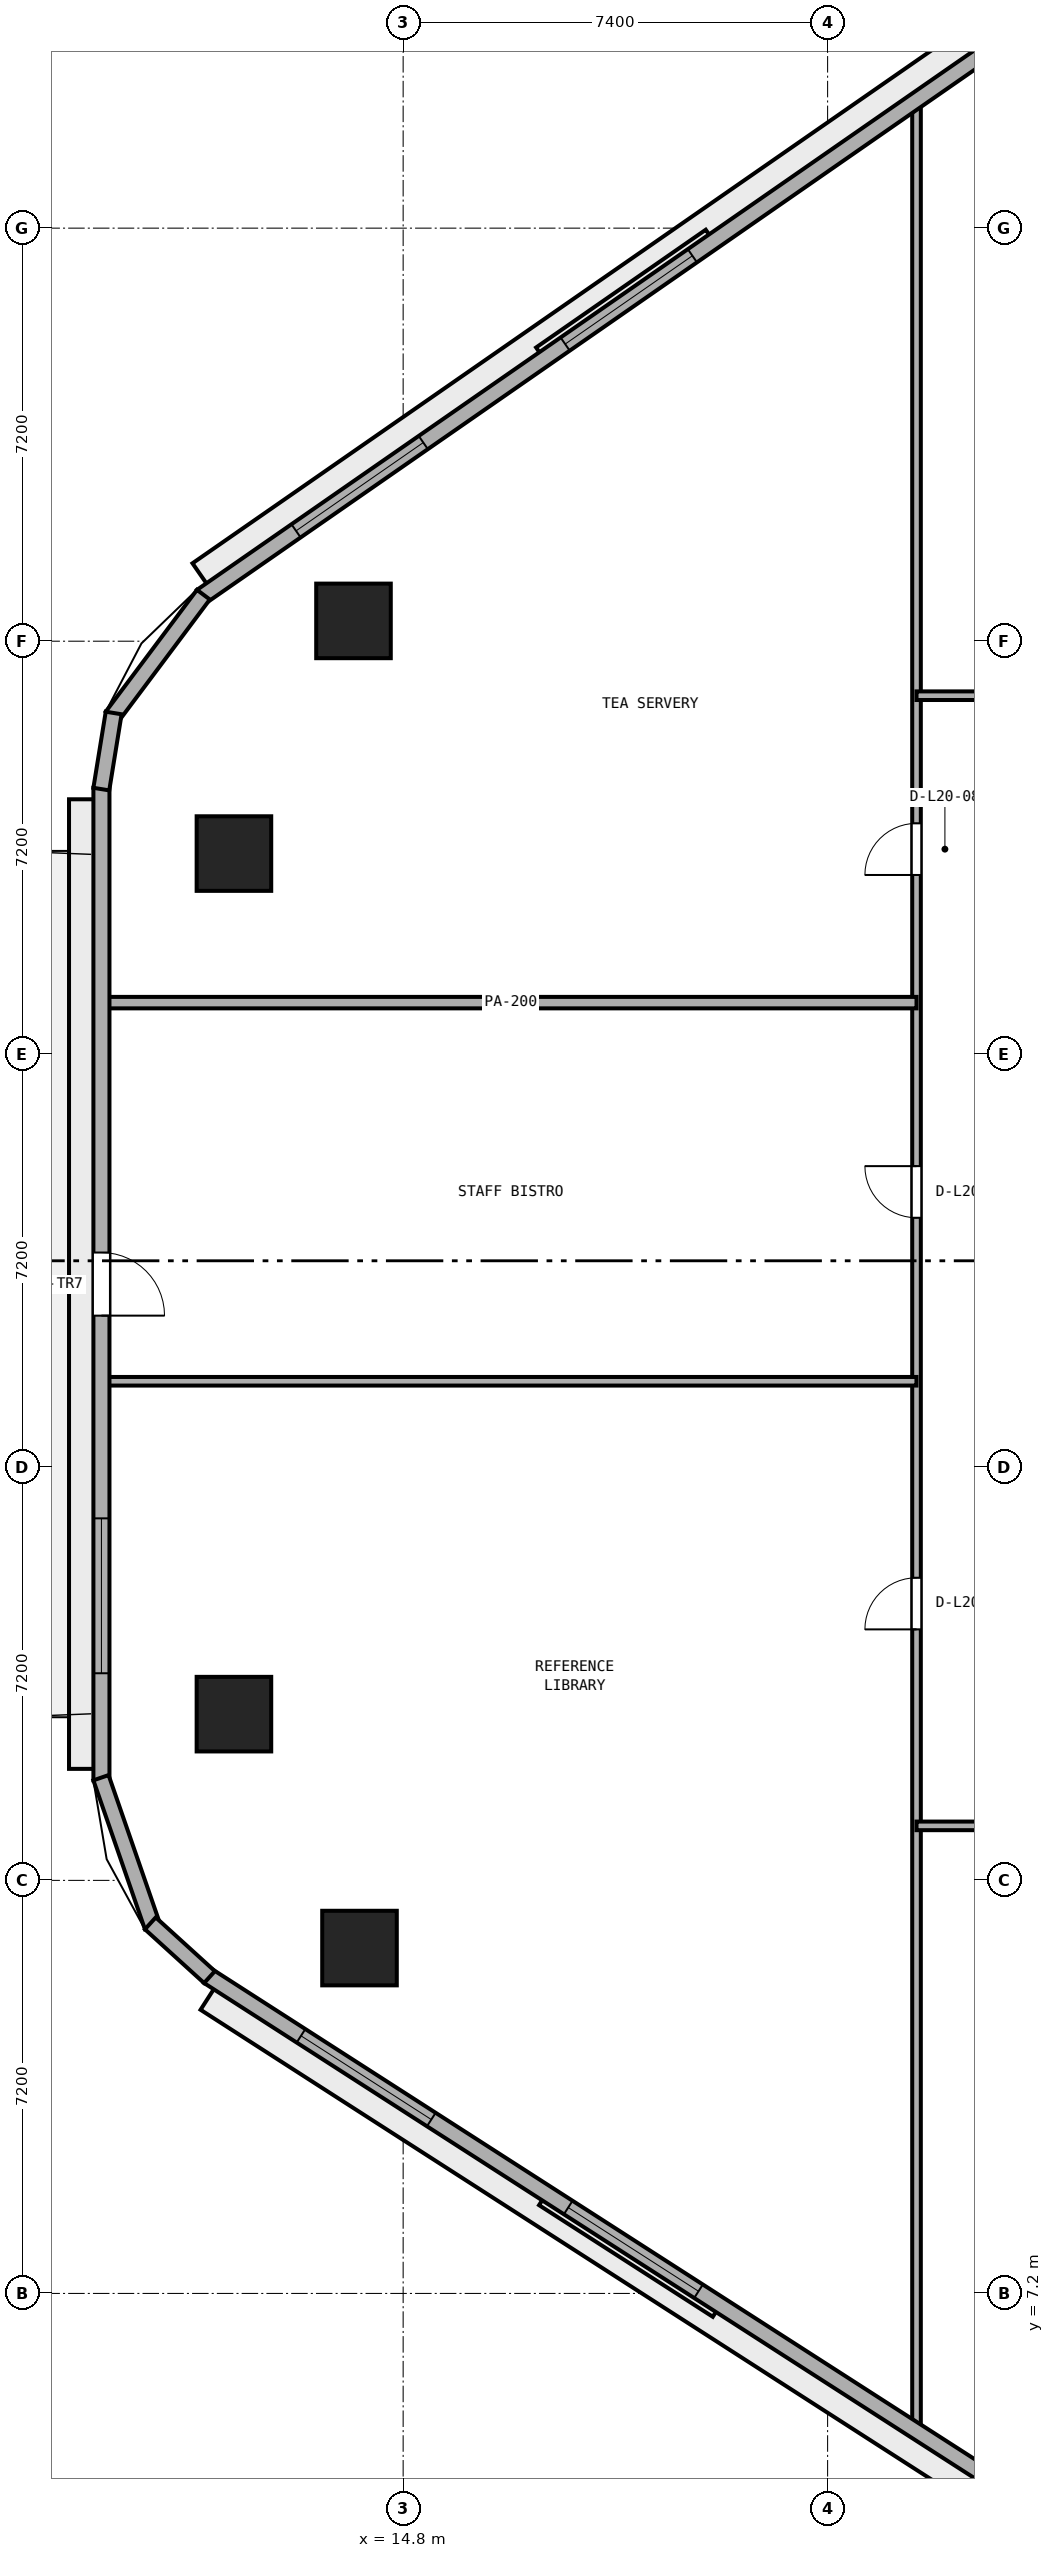
"""IFC4 building model, lengths in metres.
Left out: names, types, materials, properties, quantities, classifications, styles, units other than length and angle.
Written with IfcOpenShell. Run it as: python <this file> out.ifc"""

import sys

from ifc_helpers import new_model, si_unit, direction, frame, frame_2d, origin, origin_2d, place, context, subcontext, project, spatial, rectangle, extrude, element, fill, save


model = new_model("IFC4")
c1 = context("Model", 3, precision=1e-05, world=origin(), true_north=direction((0.0, 1.0)))
c2 = subcontext(c1, "Body", "Model", "MODEL_VIEW")
j1 = project(units=[si_unit("LENGTHUNIT", "METRE"), si_unit("PLANEANGLEUNIT", "RADIAN")], contexts=[c1])
p1 = place(None, origin())
s1 = spatial("IfcSite", under=j1, at=p1, CompositionType="ELEMENT")
p2 = place(p1, origin())
s2 = spatial("IfcBuilding", under=s1, at=p2, CompositionType="ELEMENT")
p3 = place(p2, frame((0.0, 0.0, 82.0)))
s3 = spatial("IfcBuildingStorey", under=s2, at=p3, CompositionType="ELEMENT", Elevation=82.0)
for number, where, z_axis, x_axis in (
    (1, (13.934, 36.354, 0.0), (0.0, 0.0, 1.0), (1.0, 0.0, 0.0)),
    (2, (11.85, 32.298, 0.0), (0.0, 0.0, 1.0), (1.0, 0.0, 0.0)),
    (3, (11.85, 17.298, 0.0), (0.0, 0.0, 1.0), (1.0, 0.0, 0.0)),
    (4, (14.039, 13.22, 0.0), (0.0, 0.0, 1.0), (1.0, 0.0, 0.0)),
):
    element("IfcColumn", number, at=place(p3, frame(where, z_axis=z_axis, x_axis=x_axis)), inside=s3, PredefinedType="COLUMN", context=c2, shape_type="SweptSolid", body=[
        extrude(rectangle(XDim=1.3, YDim=1.3, at=origin_2d()), origin(), (0.0, 0.0, 1.0), 3.8),
    ])
p4 = place(p3, frame((23.75, 4.769, 0.0), z_axis=(0.0, 0.0, 1.0), x_axis=(0.0, 1.0, 0.0)))
e5 = element("IfcWall", 5, at=p4, inside=s3, PredefinedType="PARTITIONING", context=c2, shape_type="SweptSolid", body=[
    extrude(rectangle(XDim=40.691, YDim=0.15, at=frame_2d((20.345, 0.0))), origin(), (0.0, 0.0, 1.0), 3.525),
])
p5 = place(p4, frame((14.006, 0.0, 0.0)))
e6 = element("IfcOpeningElement", 6, at=p5, cuts=e5, PredefinedType="OPENING", context=c2, shape_type="SweptSolid", body=[
    extrude(rectangle(XDim=0.9, YDim=2.1, at=frame_2d((0.45, 1.05))), frame((0.0, 0.085, 0.0), z_axis=(0.0, -1.0, 0.0), x_axis=(1.0, 0.0, 0.0)), (0.0, 0.0, 1.0), 0.17),
])
p6 = place(p4, frame((21.181, 0.0, 0.0)))
e7 = element("IfcOpeningElement", 7, at=p6, cuts=e5, PredefinedType="OPENING", context=c2, shape_type="SweptSolid", body=[
    extrude(rectangle(XDim=0.9, YDim=2.1, at=frame_2d((0.45, 1.05))), frame((0.0, 0.085, 0.0), z_axis=(0.0, -1.0, 0.0), x_axis=(1.0, 0.0, 0.0)), (0.0, 0.0, 1.0), 0.17),
])
p7 = place(p4, frame((27.156, 0.0, 0.0)))
e8 = element("IfcOpeningElement", 8, at=p7, cuts=e5, PredefinedType="OPENING", context=c2, shape_type="SweptSolid", body=[
    extrude(rectangle(XDim=0.9, YDim=2.1, at=frame_2d((0.45, 1.05))), frame((0.0, 0.085, 0.0), z_axis=(0.0, -1.0, 0.0), x_axis=(1.0, 0.0, 0.0)), (0.0, 0.0, 1.0), 0.17),
])
p8 = place(p3, frame((23.75, 15.35, 0.0), z_axis=(0.0, 0.0, 1.0), x_axis=(1.0, 0.0, 0.0)))
e9 = element("IfcWall", 9, at=p8, inside=s3, PredefinedType="PARTITIONING", context=c2, shape_type="SweptSolid", body=[
    extrude(rectangle(XDim=26.5, YDim=0.15, at=frame_2d((13.25, 0.0))), origin(), (0.0, 0.0, 1.0), 3.525),
])
p9 = place(p8, frame((4.445, 0.0, 0.0)))
e10 = element("IfcOpeningElement", 10, at=p9, cuts=e9, PredefinedType="OPENING", context=c2, shape_type="SweptSolid", body=[
    extrude(rectangle(XDim=0.9, YDim=2.1, at=frame_2d((0.45, 1.05))), frame((0.0, 0.085, 0.0), z_axis=(0.0, -1.0, 0.0), x_axis=(1.0, 0.0, 0.0)), (0.0, 0.0, 1.0), 0.17),
])
p10 = place(p8, frame((17.455, 0.0, 0.0)))
e11 = element("IfcOpeningElement", 11, at=p10, cuts=e9, PredefinedType="OPENING", context=c2, shape_type="SweptSolid", body=[
    extrude(rectangle(XDim=0.9, YDim=2.1, at=frame_2d((0.45, 1.05))), frame((0.0, 0.085, 0.0), z_axis=(0.0, -1.0, 0.0), x_axis=(1.0, 0.0, 0.0)), (0.0, 0.0, 1.0), 0.17),
])
p11 = place(p3, frame((9.605, 23.1, 0.0), z_axis=(0.0, 0.0, 1.0), x_axis=(1.0, 0.0, 0.0)))
e12 = element("IfcWall", 12, at=p11, inside=s3, PredefinedType="PARTITIONING", context=c2, shape_type="SweptSolid", body=[
    extrude(rectangle(XDim=14.144, YDim=0.15, at=frame_2d((7.072, 0.0))), origin(), (0.0, 0.0, 1.0), 3.525),
])
p12 = place(p3, frame((9.605, 29.7, 0.0), z_axis=(0.0, 0.0, 1.0), x_axis=(1.0, 0.0, 0.0)))
e13 = element("IfcWall", 13, at=p12, inside=s3, PredefinedType="PARTITIONING", context=c2, shape_type="SweptSolid", body=[
    extrude(rectangle(XDim=14.145, YDim=0.2, at=frame_2d((7.073, 0.0))), origin(), (0.0, 0.0, 1.0), 3.525),
])
p13 = place(p3, frame((23.75, 35.05, 0.0), z_axis=(0.0, 0.0, 1.0), x_axis=(1.0, 0.0, 0.0)))
e14 = element("IfcWall", 14, at=p13, inside=s3, PredefinedType="PARTITIONING", context=c2, shape_type="SweptSolid", body=[
    extrude(rectangle(XDim=26.5, YDim=0.15, at=frame_2d((13.25, 0.0))), origin(), (0.0, 0.0, 1.0), 3.525),
])
p14 = place(p13, frame((2.195, 0.0, 0.0)))
e15 = element("IfcOpeningElement", 15, at=p14, cuts=e14, PredefinedType="OPENING", context=c2, shape_type="SweptSolid", body=[
    extrude(rectangle(XDim=1.0, YDim=2.12, at=frame_2d((0.5, 1.06))), frame((0.0, 0.085, 0.0), z_axis=(0.0, -1.0, 0.0), x_axis=(1.0, 0.0, 0.0)), (0.0, 0.0, 1.0), 0.17),
])
p15 = place(p13, frame((10.4, 0.0, 0.0)))
e16 = element("IfcOpeningElement", 16, at=p15, cuts=e14, PredefinedType="OPENING", context=c2, shape_type="SweptSolid", body=[
    extrude(rectangle(XDim=1.0, YDim=2.12, at=frame_2d((0.5, 1.06))), frame((0.0, 0.085, 0.0), z_axis=(0.0, -1.0, 0.0), x_axis=(1.0, 0.0, 0.0)), (0.0, 0.0, 1.0), 0.17),
])
p16 = place(p13, frame((21.005, 0.0, 0.0)))
e17 = element("IfcOpeningElement", 17, at=p16, cuts=e14, PredefinedType="OPENING", context=c2, shape_type="SweptSolid", body=[
    extrude(rectangle(XDim=0.9, YDim=2.1, at=frame_2d((0.45, 1.05))), frame((0.0, 0.085, 0.0), z_axis=(0.0, -1.0, 0.0), x_axis=(1.0, 0.0, 0.0)), (0.0, 0.0, 1.0), 0.17),
])
p17 = place(p3, frame((26.182, 47.118, 0.0), z_axis=(0.0, 0.0, 1.0), x_axis=(-0.821547956627, -0.570139417127, 0.0)))
e18 = element("IfcWall", 18, at=p17, inside=s3, PredefinedType="STANDARD", context=c2, shape_type="SweptSolid", body=[
    extrude(rectangle(XDim=18.132, YDim=0.28, at=frame_2d((9.066, 0.0))), origin(), (0.0, 0.0, 1.0), 3.525),
])
p18 = place(p17, frame((7.716, 0.0, 0.9)))
e19 = element("IfcOpeningElement", 19, at=p18, cuts=e18, PredefinedType="OPENING", context=c2, shape_type="SweptSolid", body=[
    extrude(rectangle(XDim=2.7, YDim=1.75, at=frame_2d((1.35, 0.875))), frame((0.0, 0.15, 0.0), z_axis=(0.0, -1.0, 0.0), x_axis=(1.0, 0.0, 0.0)), (0.0, 0.0, 1.0), 0.3),
])
p19 = place(p17, frame((13.427, 0.0, 0.9)))
e20 = element("IfcOpeningElement", 20, at=p19, cuts=e18, PredefinedType="OPENING", context=c2, shape_type="SweptSolid", body=[
    extrude(rectangle(XDim=2.7, YDim=1.75, at=frame_2d((1.35, 0.875))), frame((0.0, 0.15, 0.0), z_axis=(0.0, -1.0, 0.0), x_axis=(1.0, 0.0, 0.0)), (0.0, 0.0, 1.0), 0.3),
])
p20 = place(p3, frame((9.54, 33.444, 0.0), z_axis=(0.0, 0.0, 1.0), x_axis=(0.0, -1.0, 0.0)))
e21 = element("IfcWall", 21, at=p20, inside=s3, PredefinedType="STANDARD", context=c2, shape_type="SweptSolid", body=[
    extrude(rectangle(XDim=17.301, YDim=0.28, at=frame_2d((8.65, 0.0))), origin(), (0.0, 0.0, 1.0), 3.525),
])
p21 = place(p20, frame((8.1, 0.0, 0.0)))
e22 = element("IfcOpeningElement", 22, at=p21, cuts=e21, PredefinedType="OPENING", context=c2, shape_type="SweptSolid", body=[
    extrude(rectangle(XDim=1.1, YDim=2.2, at=frame_2d((0.55, 1.1))), frame((0.0, 0.15, 0.0), z_axis=(0.0, -1.0, 0.0), x_axis=(1.0, 0.0, 0.0)), (0.0, 0.0, 1.0), 0.3),
])
p22 = place(p20, frame((12.734, 0.0, 0.9)))
e23 = element("IfcOpeningElement", 23, at=p22, cuts=e21, PredefinedType="OPENING", context=c2, shape_type="SweptSolid", body=[
    extrude(rectangle(XDim=2.7, YDim=1.75, at=frame_2d((1.35, 0.875))), frame((0.0, 0.15, 0.0), z_axis=(0.0, -1.0, 0.0), x_axis=(1.0, 0.0, 0.0)), (0.0, 0.0, 1.0), 0.3),
])
p23 = place(p3, frame((11.405, 12.728, 0.0), z_axis=(0.0, 0.0, 1.0), x_axis=(0.841304564637, -0.540561402175, 0.0)))
e24 = element("IfcWall", 24, at=p23, inside=s3, PredefinedType="STANDARD", context=c2, shape_type="SweptSolid", body=[
    extrude(rectangle(XDim=17.612, YDim=0.28, at=frame_2d((8.806, 0.0))), origin(), (0.0, 0.0, 1.0), 3.525),
])
p24 = place(p23, frame((1.919, 0.0, 0.9)))
e25 = element("IfcOpeningElement", 25, at=p24, cuts=e24, PredefinedType="OPENING", context=c2, shape_type="SweptSolid", body=[
    extrude(rectangle(XDim=2.7, YDim=1.75, at=frame_2d((1.35, 0.875))), frame((0.0, 0.15, 0.0), z_axis=(0.0, -1.0, 0.0), x_axis=(1.0, 0.0, 0.0)), (0.0, 0.0, 1.0), 0.3),
])
p25 = place(p23, frame((7.456, 0.0, 0.9)))
e26 = element("IfcOpeningElement", 26, at=p25, cuts=e24, PredefinedType="OPENING", context=c2, shape_type="SweptSolid", body=[
    extrude(rectangle(XDim=2.7, YDim=1.75, at=frame_2d((1.35, 0.875))), frame((0.0, 0.15, 0.0), z_axis=(0.0, -1.0, 0.0), x_axis=(1.0, 0.0, 0.0)), (0.0, 0.0, 1.0), 0.3),
])
p26 = place(p3, frame((11.318, 36.811, 0.0), z_axis=(0.0, 0.0, 1.0), x_axis=(-0.599455152629, -0.800408345775, 0.0)))
e27 = element("IfcWall", 27, at=p26, inside=s3, PredefinedType="STANDARD", context=c2, shape_type="SweptSolid", body=[
    extrude(rectangle(XDim=2.653, YDim=0.28, at=frame_2d((1.327, 0.0))), origin(), (0.0, 0.0, 1.0), 3.525),
])
p27 = place(p3, frame((9.753, 34.749, 0.0), z_axis=(0.0, 0.0, 1.0), x_axis=(-0.160037671962, -0.987110907423, 0.0)))
e28 = element("IfcWall", 28, at=p27, inside=s3, PredefinedType="STANDARD", context=c2, shape_type="SweptSolid", body=[
    extrude(rectangle(XDim=1.344, YDim=0.28, at=frame_2d((0.672, 0.0))), origin(), (0.0, 0.0, 1.0), 3.525),
])
p28 = place(p3, frame((9.532, 16.189, 0.0), z_axis=(0.0, 0.0, 1.0), x_axis=(0.32708309668, -0.944995580871, 0.0)))
e29 = element("IfcWall", 29, at=p28, inside=s3, PredefinedType="STANDARD", context=c2, shape_type="SweptSolid", body=[
    extrude(rectangle(XDim=2.748, YDim=0.28, at=frame_2d((1.374, 0.0))), origin(), (0.0, 0.0, 1.0), 3.525),
])
p29 = place(p3, frame((10.393, 13.651, 0.0), z_axis=(0.0, 0.0, 1.0), x_axis=(0.74003521851, -0.672568119498, 0.0)))
e30 = element("IfcWall", 30, at=p29, inside=s3, PredefinedType="STANDARD", context=c2, shape_type="SweptSolid", body=[
    extrude(rectangle(XDim=1.393, YDim=0.28, at=frame_2d((0.697, 0.0))), origin(), (0.0, 0.0, 1.0), 3.525),
])
p30 = place(p5, origin())
e31 = element("IfcDoor", 31, at=p30, inside=s3, OperationType="SINGLE_SWING_LEFT", PredefinedType="DOOR", context=c2, shape_type="SweptSolid", body=[
    extrude(rectangle(XDim=0.9, YDim=2.1, at=frame_2d((0.45, 1.05))), frame((0.0, 0.025, 0.0), z_axis=(0.0, -1.0, 0.0), x_axis=(1.0, 0.0, 0.0)), (0.0, 0.0, 1.0), 0.05),
])
fill(e6, e31)
p31 = place(p6, origin())
e32 = element("IfcDoor", 32, at=p31, inside=s3, OperationType="SINGLE_SWING_RIGHT", PredefinedType="DOOR", context=c2, shape_type="SweptSolid", body=[
    extrude(rectangle(XDim=0.9, YDim=2.1, at=frame_2d((0.45, 1.05))), frame((0.0, 0.025, 0.0), z_axis=(0.0, -1.0, 0.0), x_axis=(1.0, 0.0, 0.0)), (0.0, 0.0, 1.0), 0.05),
])
fill(e7, e32)
p32 = place(p7, origin())
e33 = element("IfcDoor", 33, at=p32, inside=s3, OperationType="SINGLE_SWING_LEFT", PredefinedType="DOOR", context=c2, shape_type="SweptSolid", body=[
    extrude(rectangle(XDim=0.9, YDim=2.1, at=frame_2d((0.45, 1.05))), frame((0.0, 0.025, 0.0), z_axis=(0.0, -1.0, 0.0), x_axis=(1.0, 0.0, 0.0)), (0.0, 0.0, 1.0), 0.05),
])
fill(e8, e33)
p33 = place(p18, origin())
e34 = element("IfcWindow", 34, at=p33, inside=s3, PartitioningType="SINGLE_PANEL", PredefinedType="WINDOW", context=c2, shape_type="SweptSolid", body=[
    extrude(rectangle(XDim=2.7, YDim=1.75, at=frame_2d((1.35, 0.875))), frame((0.0, 0.03, 0.0), z_axis=(0.0, -1.0, 0.0), x_axis=(1.0, 0.0, 0.0)), (0.0, 0.0, 1.0), 0.06),
])
fill(e19, e34)
p34 = place(p19, origin())
e35 = element("IfcWindow", 35, at=p34, inside=s3, PartitioningType="SINGLE_PANEL", PredefinedType="WINDOW", context=c2, shape_type="SweptSolid", body=[
    extrude(rectangle(XDim=2.7, YDim=1.75, at=frame_2d((1.35, 0.875))), frame((0.0, 0.03, 0.0), z_axis=(0.0, -1.0, 0.0), x_axis=(1.0, 0.0, 0.0)), (0.0, 0.0, 1.0), 0.06),
])
fill(e20, e35)
p35 = place(p21, origin())
e36 = element("IfcDoor", 36, at=p35, inside=s3, OperationType="SINGLE_SWING_RIGHT", PredefinedType="DOOR", context=c2, shape_type="SweptSolid", body=[
    extrude(rectangle(XDim=1.1, YDim=2.2, at=frame_2d((0.55, 1.1))), frame((0.0, 0.025, 0.0), z_axis=(0.0, -1.0, 0.0), x_axis=(1.0, 0.0, 0.0)), (0.0, 0.0, 1.0), 0.05),
])
fill(e22, e36)
p36 = place(p22, origin())
e37 = element("IfcWindow", 37, at=p36, inside=s3, PartitioningType="SINGLE_PANEL", PredefinedType="WINDOW", context=c2, shape_type="SweptSolid", body=[
    extrude(rectangle(XDim=2.7, YDim=1.75, at=frame_2d((1.35, 0.875))), frame((0.0, 0.03, 0.0), z_axis=(0.0, -1.0, 0.0), x_axis=(1.0, 0.0, 0.0)), (0.0, 0.0, 1.0), 0.06),
])
fill(e23, e37)
p37 = place(p24, origin())
e38 = element("IfcWindow", 38, at=p37, inside=s3, PartitioningType="SINGLE_PANEL", PredefinedType="WINDOW", context=c2, shape_type="SweptSolid", body=[
    extrude(rectangle(XDim=2.7, YDim=1.75, at=frame_2d((1.35, 0.875))), frame((0.0, 0.03, 0.0), z_axis=(0.0, -1.0, 0.0), x_axis=(1.0, 0.0, 0.0)), (0.0, 0.0, 1.0), 0.06),
])
fill(e25, e38)
p38 = place(p25, origin())
e39 = element("IfcWindow", 39, at=p38, inside=s3, PartitioningType="SINGLE_PANEL", PredefinedType="WINDOW", context=c2, shape_type="SweptSolid", body=[
    extrude(rectangle(XDim=2.7, YDim=1.75, at=frame_2d((1.35, 0.875))), frame((0.0, 0.03, 0.0), z_axis=(0.0, -1.0, 0.0), x_axis=(1.0, 0.0, 0.0)), (0.0, 0.0, 1.0), 0.06),
])
fill(e26, e39)
save(model, sys.argv[1])
